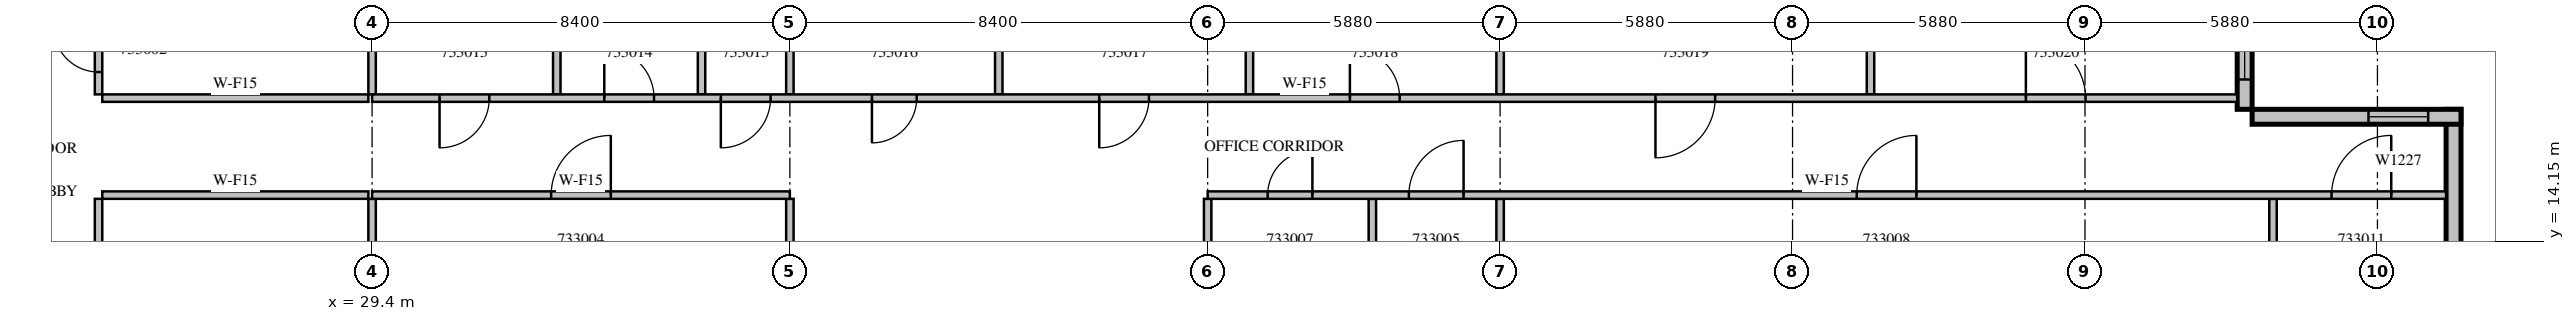
"""IFC4 building model, lengths in metres.
Left out: names, types, materials, properties, quantities, classifications, styles, units other than length and angle.
Written with IfcOpenShell. Run it as: python <this file> out.ifc"""

import sys

from ifc_helpers import new_model, si_unit, direction, frame, frame_2d, origin, place, context, subcontext, project, spatial, rectangle, extrude, source, transform, mapped, element, fill, save


model = new_model("IFC4")
c1 = context("Model", 3, precision=1e-05, world=origin(), true_north=direction((0.0, 1.0)))
c2 = subcontext(c1, "Body", "Model", "MODEL_VIEW")
j1 = project(units=[si_unit("LENGTHUNIT", "METRE"), si_unit("PLANEANGLEUNIT", "RADIAN")], contexts=[c1])
p1 = place(None, origin())
s1 = spatial("IfcSite", under=j1, at=p1, CompositionType="ELEMENT")
p2 = place(p1, origin())
s2 = spatial("IfcBuilding", under=s1, at=p2, CompositionType="ELEMENT")
p3 = place(p2, frame((0.0, 0.0, 149.7)))
s3 = spatial("IfcBuildingStorey", under=s2, at=p3, CompositionType="ELEMENT", Elevation=149.7)
m1 = source(origin(), c2, "Body", "SweptSolid", [
    extrude(rectangle(XDim=6.3, YDim=0.3, at=frame_2d((3.15, 0.0))), origin(), (0.0, 0.0, 1.0), 3.8),
])
p4 = place(p3, frame((71.25, 10.5, 0.0), z_axis=(0.0, 0.0, 1.0), x_axis=(0.0, 1.0, 0.0)))
e1 = element("IfcWall", 1, at=p4, inside=s3, PredefinedType="STANDARD", context=c2, shape_type="MappedRepresentation", body=[
    mapped(m1, transform((0.0, 0.0, 0.0), scale=1.0)),
])
m2 = source(origin(), c2, "Body", "SweptSolid", [
    extrude(rectangle(XDim=1.2, YDim=2.7, at=frame_2d((0.6, 1.35))), frame((0.0, 0.16, 0.0), z_axis=(0.0, -1.0, 0.0), x_axis=(1.0, 0.0, 0.0)), (0.0, 0.0, 1.0), 0.32),
])
p5 = place(p4, frame((1.025, 0.0, 0.6)))
e2 = element("IfcOpeningElement", 2, at=p5, cuts=e1, PredefinedType="OPENING", context=c2, shape_type="MappedRepresentation", body=[
    mapped(m2, transform((0.0, 0.0, 0.0), scale=1.0)),
])
m3 = source(origin(), c2, "Body", "SweptSolid", [
    extrude(rectangle(XDim=4.2, YDim=0.3, at=frame_2d((2.1, 0.0))), origin(), (0.0, 0.0, 1.0), 3.8),
])
p6 = place(p3, frame((71.4, 16.65, 0.0), z_axis=(0.0, 0.0, 1.0), x_axis=(-1.0, 0.0, 0.0)))
e3 = element("IfcWall", 3, at=p6, inside=s3, PredefinedType="STANDARD", context=c2, shape_type="MappedRepresentation", body=[
    mapped(m3, transform((0.0, 0.0, 0.0), scale=1.0)),
])
p7 = place(p6, frame((0.66, 0.0, 0.6)))
e4 = element("IfcOpeningElement", 4, at=p7, cuts=e3, PredefinedType="OPENING", context=c2, shape_type="MappedRepresentation", body=[
    mapped(m2, transform((0.0, 0.0, 0.0), scale=1.0)),
])
p8 = place(p3, frame((67.05, 16.8, 0.0), z_axis=(0.0, 0.0, 1.0), x_axis=(0.0, 1.0, 0.0)))
e5 = element("IfcWall", 5, at=p8, inside=s3, PredefinedType="STANDARD", context=c2, shape_type="MappedRepresentation", body=[
    mapped(m3, transform((0.0, 0.0, 0.0), scale=1.0)),
])
m4 = source(origin(), c2, "Body", "SweptSolid", [
    extrude(rectangle(XDim=3.0, YDim=2.7, at=frame_2d((1.5, 1.35))), frame((0.0, 0.16, 0.0), z_axis=(0.0, -1.0, 0.0), x_axis=(1.0, 0.0, 0.0)), (0.0, 0.0, 1.0), 0.32),
])
p9 = place(p8, frame((0.6, 0.0, 0.6)))
e6 = element("IfcOpeningElement", 6, at=p9, cuts=e5, PredefinedType="OPENING", context=c2, shape_type="MappedRepresentation", body=[
    mapped(m4, transform((0.0, 0.0, 0.0), scale=1.0)),
])
m5 = source(origin(), c2, "Body", "SweptSolid", [
    extrude(rectangle(XDim=4.295, YDim=0.15, at=frame_2d((2.147, 0.0))), origin(), (0.0, 0.0, 1.0), 3.8),
])
p10 = place(p3, frame((23.9, 15.0, 0.0), z_axis=(0.0, 0.0, 1.0), x_axis=(0.0, -1.0, 0.0)))
e7 = element("IfcWall", 7, at=p10, inside=s3, PredefinedType="PARTITIONING", context=c2, shape_type="MappedRepresentation", body=[
    mapped(m5, transform((0.0, 0.0, 0.0), scale=1.0)),
])
m6 = source(origin(), c2, "Body", "SweptSolid", [
    extrude(rectangle(XDim=0.9, YDim=2.1, at=frame_2d((0.45, 1.05))), frame((0.0, 0.085, 0.0), z_axis=(0.0, -1.0, 0.0), x_axis=(1.0, 0.0, 0.0)), (0.0, 0.0, 1.0), 0.17),
])
p11 = place(p10, frame((1.113, 0.0, 0.0)))
e8 = element("IfcOpeningElement", 8, at=p11, cuts=e7, PredefinedType="OPENING", context=c2, shape_type="MappedRepresentation", body=[
    mapped(m6, transform((0.0, 0.0, 0.0), scale=1.0)),
])
m7 = source(origin(), c2, "Body", "SweptSolid", [
    extrude(rectangle(XDim=3.6, YDim=0.15, at=frame_2d((1.8, 0.0))), origin(), (0.0, 0.0, 1.0), 3.8),
])
p12 = place(p3, frame((23.9, 20.7, 0.0), z_axis=(0.0, 0.0, 1.0), x_axis=(0.0, -1.0, 0.0)))
e9 = element("IfcWall", 9, at=p12, inside=s3, PredefinedType="PARTITIONING", context=c2, shape_type="MappedRepresentation", body=[
    mapped(m7, transform((0.0, 0.0, 0.0), scale=1.0)),
])
p13 = place(p12, frame((2.25, 0.0, 0.0)))
e10 = element("IfcOpeningElement", 10, at=p13, cuts=e9, PredefinedType="OPENING", context=c2, shape_type="MappedRepresentation", body=[
    mapped(m6, transform((0.0, 0.0, 0.0), scale=1.0)),
])
m8 = source(origin(), c2, "Body", "SweptSolid", [
    extrude(rectangle(XDim=5.35, YDim=0.15, at=frame_2d((2.675, 0.0))), origin(), (0.0, 0.0, 1.0), 3.8),
])
for number, where, z_axis, x_axis in (
    (11, (29.325, 15.075, 0.0), (0.0, 0.0, 1.0), (-1.0, 0.0, 0.0)),
    (12, (23.975, 17.025, 0.0), (0.0, 0.0, 1.0), (1.0, 0.0, 0.0)),
):
    element("IfcWall", number, at=place(p3, frame(where, z_axis=z_axis, x_axis=x_axis)), inside=s3, PredefinedType="PARTITIONING", context=c2, shape_type="MappedRepresentation", body=[
        mapped(m8, transform((0.0, 0.0, 0.0), scale=1.0)),
    ])
m9 = source(origin(), c2, "Body", "SweptSolid", [
    extrude(rectangle(XDim=3.976, YDim=0.15, at=frame_2d((1.988, 0.0))), origin(), (0.0, 0.0, 1.0), 3.8),
])
p14 = place(p3, frame((29.4, 11.024, 0.0), z_axis=(0.0, 0.0, 1.0), x_axis=(0.0, 1.0, 0.0)))
e13 = element("IfcWall", 13, at=p14, inside=s3, PredefinedType="PARTITIONING", context=c2, shape_type="MappedRepresentation", body=[
    mapped(m9, transform((0.0, 0.0, 0.0), scale=1.0)),
])
m10 = source(origin(), c2, "Body", "SweptSolid", [
    extrude(rectangle(XDim=2.851, YDim=0.15, at=frame_2d((1.425, 0.0))), origin(), (0.0, 0.0, 1.0), 3.8),
])
p15 = place(p3, frame((29.4, 17.1, 0.0), z_axis=(0.0, 0.0, 1.0), x_axis=(0.0, 1.0, 0.0)))
e14 = element("IfcWall", 14, at=p15, inside=s3, PredefinedType="PARTITIONING", context=c2, shape_type="MappedRepresentation", body=[
    mapped(m10, transform((0.0, 0.0, 0.0), scale=1.0)),
])
p16 = place(p3, frame((37.8, 11.024, 0.0), z_axis=(0.0, 0.0, 1.0), x_axis=(0.0, 1.0, 0.0)))
e15 = element("IfcWall", 15, at=p16, inside=s3, PredefinedType="PARTITIONING", context=c2, shape_type="MappedRepresentation", body=[
    mapped(m9, transform((0.0, 0.0, 0.0), scale=1.0)),
])
m11 = source(origin(), c2, "Body", "SweptSolid", [
    extrude(rectangle(XDim=3.825, YDim=0.15, at=frame_2d((1.913, 0.0))), origin(), (0.0, 0.0, 1.0), 3.8),
])
for number, where, z_axis, x_axis in (
    (16, (49.512, 11.175, 0.0), (0.0, 0.0, 1.0), (0.0, 1.0, 0.0)),
    (17, (46.2, 11.175, 0.0), (0.0, 0.0, 1.0), (0.0, 1.0, 0.0)),
    (18, (52.08, 11.175, 0.0), (0.0, 0.0, 1.0), (0.0, 1.0, 0.0)),
    (19, (67.62, 11.175, 0.0), (0.0, 0.0, 1.0), (0.0, 1.0, 0.0)),
):
    element("IfcWall", number, at=place(p3, frame(where, z_axis=z_axis, x_axis=x_axis)), inside=s3, PredefinedType="PARTITIONING", context=c2, shape_type="MappedRepresentation", body=[
        mapped(m11, transform((0.0, 0.0, 0.0), scale=1.0)),
    ])
for number, where, z_axis, x_axis in (
    (20, (33.113, 20.7, 0.0), (0.0, 0.0, 1.0), (0.0, -1.0, 0.0)),
    (21, (36.024, 20.7, 0.0), (0.0, 0.0, 1.0), (0.0, -1.0, 0.0)),
    (22, (47.04, 20.7, 0.0), (0.0, 0.0, 1.0), (0.0, -1.0, 0.0)),
    (23, (59.528, 20.7, 0.0), (0.0, 0.0, 1.0), (0.0, -1.0, 0.0)),
):
    element("IfcWall", number, at=place(p3, frame(where, z_axis=z_axis, x_axis=x_axis)), inside=s3, PredefinedType="PARTITIONING", context=c2, shape_type="MappedRepresentation", body=[
        mapped(m7, transform((0.0, 0.0, 0.0), scale=1.0)),
    ])
p17 = place(p3, frame((37.8, 17.1, 0.0), z_axis=(0.0, 0.0, 1.0), x_axis=(0.0, 1.0, 0.0)))
e24 = element("IfcWall", 24, at=p17, inside=s3, PredefinedType="PARTITIONING", context=c2, shape_type="MappedRepresentation", body=[
    mapped(m10, transform((0.0, 0.0, 0.0), scale=1.0)),
])
p18 = place(p3, frame((42.0, 17.1, 0.0), z_axis=(0.0, 0.0, 1.0), x_axis=(0.0, 1.0, 0.0)))
e25 = element("IfcWall", 25, at=p18, inside=s3, PredefinedType="PARTITIONING", context=c2, shape_type="MappedRepresentation", body=[
    mapped(m7, transform((0.0, 0.0, 0.0), scale=1.0)),
])
p19 = place(p3, frame((52.08, 17.1, 0.0), z_axis=(0.0, 0.0, 1.0), x_axis=(0.0, 1.0, 0.0)))
e26 = element("IfcWall", 26, at=p19, inside=s3, PredefinedType="PARTITIONING", context=c2, shape_type="MappedRepresentation", body=[
    mapped(m10, transform((0.0, 0.0, 0.0), scale=1.0)),
])
m12 = source(origin(), c2, "Body", "SweptSolid", [
    extrude(rectangle(XDim=8.4, YDim=0.15, at=frame_2d((4.2, 0.0))), origin(), (0.0, 0.0, 1.0), 3.8),
])
p20 = place(p3, frame((37.8, 15.075, 0.0), z_axis=(0.0, 0.0, 1.0), x_axis=(-1.0, 0.0, 0.0)))
e27 = element("IfcWall", 27, at=p20, inside=s3, PredefinedType="PARTITIONING", context=c2, shape_type="MappedRepresentation", body=[
    mapped(m12, transform((0.0, 0.0, 0.0), scale=1.0)),
])
m13 = source(origin(), c2, "Body", "SweptSolid", [
    extrude(rectangle(XDim=1.2, YDim=2.1, at=frame_2d((0.6, 1.05))), frame((0.0, 0.085, 0.0), z_axis=(0.0, -1.0, 0.0), x_axis=(1.0, 0.0, 0.0)), (0.0, 0.0, 1.0), 0.17),
])
p21 = place(p20, frame((3.6, 0.0, 0.0)))
e28 = element("IfcOpeningElement", 28, at=p21, cuts=e27, PredefinedType="OPENING", context=c2, shape_type="MappedRepresentation", body=[
    mapped(m13, transform((0.0, 0.0, 0.0), scale=1.0)),
])
m14 = source(origin(), c2, "Body", "SweptSolid", [
    extrude(rectangle(XDim=24.9, YDim=0.15, at=frame_2d((12.45, 0.0))), origin(), (0.0, 0.0, 1.0), 3.8),
])
p22 = place(p3, frame((71.1, 15.075, 0.0), z_axis=(0.0, 0.0, 1.0), x_axis=(-1.0, 0.0, 0.0)))
e29 = element("IfcWall", 29, at=p22, inside=s3, PredefinedType="PARTITIONING", context=c2, shape_type="MappedRepresentation", body=[
    mapped(m14, transform((0.0, 0.0, 0.0), scale=1.0)),
])
m15 = source(origin(), c2, "Body", "SweptSolid", [
    extrude(rectangle(XDim=1.1, YDim=2.1, at=frame_2d((0.55, 1.05))), frame((0.0, 0.085, 0.0), z_axis=(0.0, -1.0, 0.0), x_axis=(1.0, 0.0, 0.0)), (0.0, 0.0, 1.0), 0.17),
])
p23 = place(p22, frame((19.754, 0.0, 0.0)))
e30 = element("IfcOpeningElement", 30, at=p23, cuts=e29, PredefinedType="OPENING", context=c2, shape_type="MappedRepresentation", body=[
    mapped(m15, transform((0.0, 0.0, 0.0), scale=1.0)),
])
p24 = place(p22, frame((22.794, 0.0, 0.0)))
e31 = element("IfcOpeningElement", 31, at=p24, cuts=e29, PredefinedType="OPENING", context=c2, shape_type="MappedRepresentation", body=[
    mapped(m6, transform((0.0, 0.0, 0.0), scale=1.0)),
])
p25 = place(p22, frame((10.65, 0.0, 0.0)))
e32 = element("IfcOpeningElement", 32, at=p25, cuts=e29, PredefinedType="OPENING", context=c2, shape_type="MappedRepresentation", body=[
    mapped(m13, transform((0.0, 0.0, 0.0), scale=1.0)),
])
p26 = place(p22, frame((1.103, 0.0, 0.0)))
e33 = element("IfcOpeningElement", 33, at=p26, cuts=e29, PredefinedType="OPENING", context=c2, shape_type="MappedRepresentation", body=[
    mapped(m13, transform((0.0, 0.0, 0.0), scale=1.0)),
])
m16 = source(origin(), c2, "Body", "SweptSolid", [
    extrude(rectangle(XDim=37.5, YDim=0.15, at=frame_2d((18.75, 0.0))), origin(), (0.0, 0.0, 1.0), 3.8),
])
p27 = place(p3, frame((29.4, 17.025, 0.0), z_axis=(0.0, 0.0, 1.0), x_axis=(1.0, 0.0, 0.0)))
e34 = element("IfcWall", 34, at=p27, inside=s3, PredefinedType="PARTITIONING", context=c2, shape_type="MappedRepresentation", body=[
    mapped(m16, transform((0.0, 0.0, 0.0), scale=1.0)),
])
m17 = source(origin(), c2, "Body", "SweptSolid", [
    extrude(rectangle(XDim=1.0, YDim=2.1, at=frame_2d((0.5, 1.05))), frame((0.0, 0.085, 0.0), z_axis=(0.0, -1.0, 0.0), x_axis=(1.0, 0.0, 0.0)), (0.0, 0.0, 1.0), 0.17),
])
p28 = place(p27, frame((1.357, 0.0, 0.0)))
e35 = element("IfcOpeningElement", 35, at=p28, cuts=e34, PredefinedType="OPENING", context=c2, shape_type="MappedRepresentation", body=[
    mapped(m17, transform((0.0, 0.0, 0.0), scale=1.0)),
])
p29 = place(p27, frame((4.669, 0.0, 0.0)))
e36 = element("IfcOpeningElement", 36, at=p29, cuts=e34, PredefinedType="OPENING", context=c2, shape_type="MappedRepresentation", body=[
    mapped(m17, transform((0.0, 0.0, 0.0), scale=1.0)),
])
p30 = place(p27, frame((7.012, 0.0, 0.0)))
e37 = element("IfcOpeningElement", 37, at=p30, cuts=e34, PredefinedType="OPENING", context=c2, shape_type="MappedRepresentation", body=[
    mapped(m17, transform((0.0, 0.0, 0.0), scale=1.0)),
])
p31 = place(p27, frame((10.05, 0.0, 0.0)))
e38 = element("IfcOpeningElement", 38, at=p31, cuts=e34, PredefinedType="OPENING", context=c2, shape_type="MappedRepresentation", body=[
    mapped(m6, transform((0.0, 0.0, 0.0), scale=1.0)),
])
p32 = place(p27, frame((14.62, 0.0, 0.0)))
e39 = element("IfcOpeningElement", 39, at=p32, cuts=e34, PredefinedType="OPENING", context=c2, shape_type="MappedRepresentation", body=[
    mapped(m17, transform((0.0, 0.0, 0.0), scale=1.0)),
])
p33 = place(p27, frame((19.66, 0.0, 0.0)))
e40 = element("IfcOpeningElement", 40, at=p33, cuts=e34, PredefinedType="OPENING", context=c2, shape_type="MappedRepresentation", body=[
    mapped(m17, transform((0.0, 0.0, 0.0), scale=1.0)),
])
p34 = place(p27, frame((25.804, 0.0, 0.0)))
e41 = element("IfcOpeningElement", 41, at=p34, cuts=e34, PredefinedType="OPENING", context=c2, shape_type="MappedRepresentation", body=[
    mapped(m13, transform((0.0, 0.0, 0.0), scale=1.0)),
])
p35 = place(p27, frame((33.251, 0.0, 0.0)))
e42 = element("IfcOpeningElement", 42, at=p35, cuts=e34, PredefinedType="OPENING", context=c2, shape_type="MappedRepresentation", body=[
    mapped(m13, transform((0.0, 0.0, 0.0), scale=1.0)),
])
m18 = source(origin(), c2, "Body", "SweptSolid", [
    extrude(rectangle(XDim=1.2, YDim=2.7, at=frame_2d((0.6, 1.35))), frame((0.0, 0.03, 0.0), z_axis=(0.0, -1.0, 0.0), x_axis=(1.0, 0.0, 0.0)), (0.0, 0.0, 1.0), 0.06),
])
p36 = place(p7, origin())
e43 = element("IfcWindow", 43, at=p36, inside=s3, PartitioningType="SINGLE_PANEL", PredefinedType="WINDOW", context=c2, shape_type="MappedRepresentation", body=[
    mapped(m18, transform((0.0, 0.0, 0.0), scale=1.0)),
])
fill(e4, e43)
m19 = source(origin(), c2, "Body", "SweptSolid", [
    extrude(rectangle(XDim=3.0, YDim=2.7, at=frame_2d((1.5, 1.35))), frame((0.0, 0.03, 0.0), z_axis=(0.0, -1.0, 0.0), x_axis=(1.0, 0.0, 0.0)), (0.0, 0.0, 1.0), 0.06),
])
p37 = place(p9, origin())
e44 = element("IfcWindow", 44, at=p37, inside=s3, PartitioningType="SINGLE_PANEL", PredefinedType="WINDOW", context=c2, shape_type="MappedRepresentation", body=[
    mapped(m19, transform((0.0, 0.0, 0.0), scale=1.0)),
])
fill(e6, e44)
m20 = source(origin(), c2, "Body", "SweptSolid", [
    extrude(rectangle(XDim=0.9, YDim=2.1, at=frame_2d((0.45, 1.05))), frame((0.0, 0.025, 0.0), z_axis=(0.0, -1.0, 0.0), x_axis=(1.0, 0.0, 0.0)), (0.0, 0.0, 1.0), 0.05),
])
p38 = place(p13, origin())
e45 = element("IfcDoor", 45, at=p38, inside=s3, OperationType="SINGLE_SWING_RIGHT", PredefinedType="DOOR", context=c2, shape_type="MappedRepresentation", body=[
    mapped(m20, transform((0.0, 0.0, 0.0), scale=1.0)),
])
fill(e10, e45)
m21 = source(origin(), c2, "Body", "SweptSolid", [
    extrude(rectangle(XDim=1.2, YDim=2.1, at=frame_2d((0.6, 1.05))), frame((0.0, 0.025, 0.0), z_axis=(0.0, -1.0, 0.0), x_axis=(1.0, 0.0, 0.0)), (0.0, 0.0, 1.0), 0.05),
])
p39 = place(p21, origin())
e46 = element("IfcDoor", 46, at=p39, inside=s3, OperationType="SINGLE_SWING_RIGHT", PredefinedType="DOOR", context=c2, shape_type="MappedRepresentation", body=[
    mapped(m21, transform((0.0, 0.0, 0.0), scale=1.0)),
])
fill(e28, e46)
m22 = source(origin(), c2, "Body", "SweptSolid", [
    extrude(rectangle(XDim=1.1, YDim=2.1, at=frame_2d((0.55, 1.05))), frame((0.0, 0.025, 0.0), z_axis=(0.0, -1.0, 0.0), x_axis=(1.0, 0.0, 0.0)), (0.0, 0.0, 1.0), 0.05),
])
p40 = place(p23, origin())
e47 = element("IfcDoor", 47, at=p40, inside=s3, OperationType="SINGLE_SWING_RIGHT", PredefinedType="DOOR", context=c2, shape_type="MappedRepresentation", body=[
    mapped(m22, transform((0.0, 0.0, 0.0), scale=1.0)),
])
fill(e30, e47)
p41 = place(p24, origin())
e48 = element("IfcDoor", 48, at=p41, inside=s3, OperationType="SINGLE_SWING_RIGHT", PredefinedType="DOOR", context=c2, shape_type="MappedRepresentation", body=[
    mapped(m20, transform((0.0, 0.0, 0.0), scale=1.0)),
])
fill(e31, e48)
p42 = place(p25, origin())
e49 = element("IfcDoor", 49, at=p42, inside=s3, OperationType="SINGLE_SWING_RIGHT", PredefinedType="DOOR", context=c2, shape_type="MappedRepresentation", body=[
    mapped(m21, transform((0.0, 0.0, 0.0), scale=1.0)),
])
fill(e32, e49)
p43 = place(p26, origin())
e50 = element("IfcDoor", 50, at=p43, inside=s3, OperationType="SINGLE_SWING_RIGHT", PredefinedType="DOOR", context=c2, shape_type="MappedRepresentation", body=[
    mapped(m21, transform((0.0, 0.0, 0.0), scale=1.0)),
])
fill(e33, e50)
m23 = source(origin(), c2, "Body", "SweptSolid", [
    extrude(rectangle(XDim=1.0, YDim=2.1, at=frame_2d((0.5, 1.05))), frame((0.0, 0.025, 0.0), z_axis=(0.0, -1.0, 0.0), x_axis=(1.0, 0.0, 0.0)), (0.0, 0.0, 1.0), 0.05),
])
p44 = place(p28, origin())
e51 = element("IfcDoor", 51, at=p44, inside=s3, OperationType="SINGLE_SWING_RIGHT", PredefinedType="DOOR", context=c2, shape_type="MappedRepresentation", body=[
    mapped(m23, transform((0.0, 0.0, 0.0), scale=1.0)),
])
fill(e35, e51)
p45 = place(p29, origin())
e52 = element("IfcDoor", 52, at=p45, inside=s3, OperationType="SINGLE_SWING_LEFT", PredefinedType="DOOR", context=c2, shape_type="MappedRepresentation", body=[
    mapped(m23, transform((0.0, 0.0, 0.0), scale=1.0)),
])
fill(e36, e52)
p46 = place(p30, origin())
e53 = element("IfcDoor", 53, at=p46, inside=s3, OperationType="SINGLE_SWING_RIGHT", PredefinedType="DOOR", context=c2, shape_type="MappedRepresentation", body=[
    mapped(m23, transform((0.0, 0.0, 0.0), scale=1.0)),
])
fill(e37, e53)
p47 = place(p31, origin())
e54 = element("IfcDoor", 54, at=p47, inside=s3, OperationType="SINGLE_SWING_RIGHT", PredefinedType="DOOR", context=c2, shape_type="MappedRepresentation", body=[
    mapped(m20, transform((0.0, 0.0, 0.0), scale=1.0)),
])
fill(e38, e54)
p48 = place(p32, origin())
e55 = element("IfcDoor", 55, at=p48, inside=s3, OperationType="SINGLE_SWING_RIGHT", PredefinedType="DOOR", context=c2, shape_type="MappedRepresentation", body=[
    mapped(m23, transform((0.0, 0.0, 0.0), scale=1.0)),
])
fill(e39, e55)
p49 = place(p33, origin())
e56 = element("IfcDoor", 56, at=p49, inside=s3, OperationType="SINGLE_SWING_LEFT", PredefinedType="DOOR", context=c2, shape_type="MappedRepresentation", body=[
    mapped(m23, transform((0.0, 0.0, 0.0), scale=1.0)),
])
fill(e40, e56)
p50 = place(p34, origin())
e57 = element("IfcDoor", 57, at=p50, inside=s3, OperationType="SINGLE_SWING_RIGHT", PredefinedType="DOOR", context=c2, shape_type="MappedRepresentation", body=[
    mapped(m21, transform((0.0, 0.0, 0.0), scale=1.0)),
])
fill(e41, e57)
p51 = place(p35, origin())
e58 = element("IfcDoor", 58, at=p51, inside=s3, OperationType="SINGLE_SWING_LEFT", PredefinedType="DOOR", context=c2, shape_type="MappedRepresentation", body=[
    mapped(m21, transform((0.0, 0.0, 0.0), scale=1.0)),
])
fill(e42, e58)
save(model, sys.argv[1])
